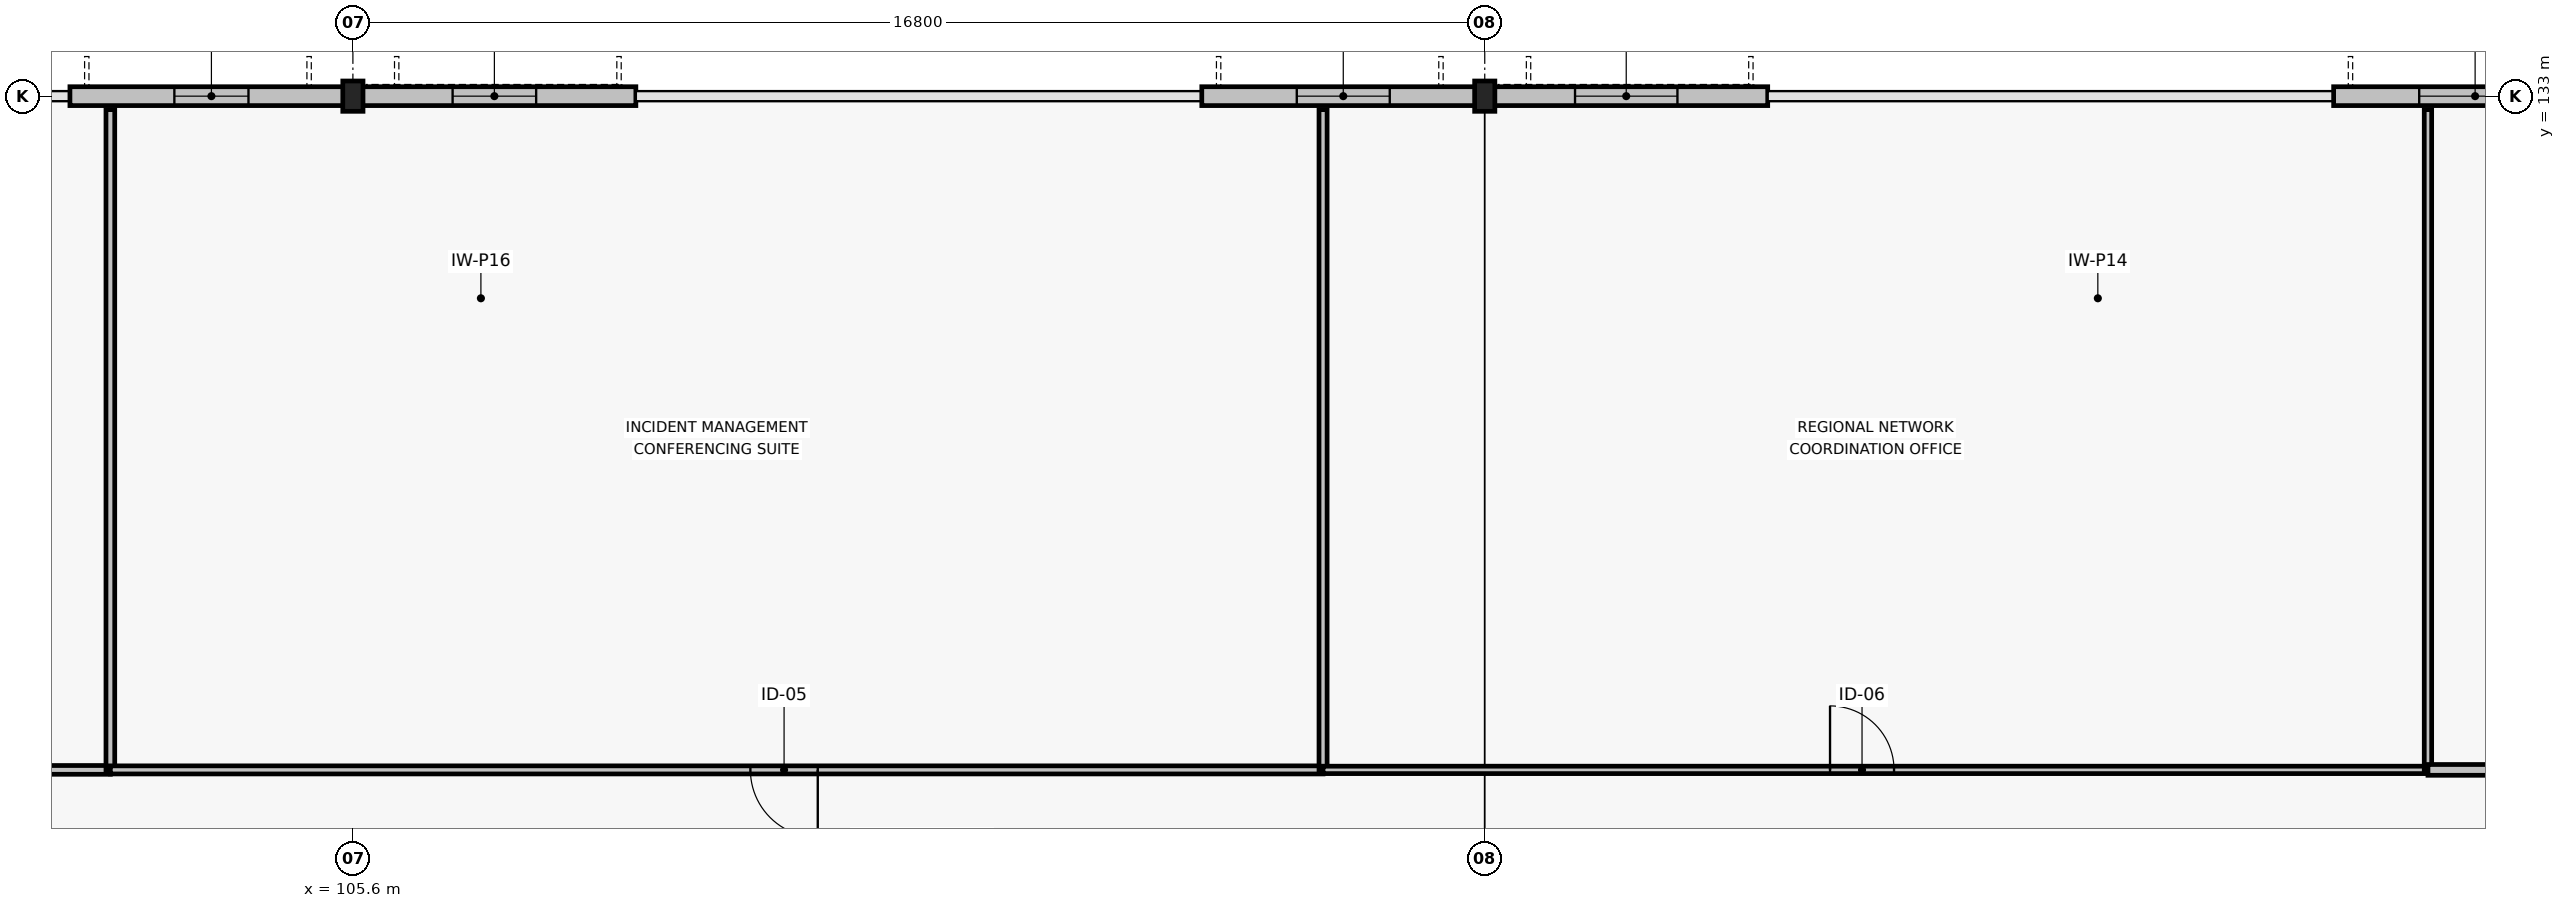
"""IFC4 building model, lengths in metres.
Left out: names, types, materials, properties, quantities, classifications, styles, units other than length and angle.
Written with IfcOpenShell. Run it as: python <this file> out.ifc"""

import sys

from ifc_helpers import new_model, si_unit, direction, frame, frame_2d, origin, origin_2d, place, context, subcontext, project, spatial, rectangle, i_section, extrude, element, fill, save


model = new_model("IFC4")
c1 = context("Model", 3, precision=1e-05, world=origin(), true_north=direction((0.0, 1.0)))
c2 = subcontext(c1, "Body", "Model", "MODEL_VIEW")
j1 = project(units=[si_unit("LENGTHUNIT", "METRE"), si_unit("PLANEANGLEUNIT", "RADIAN")], contexts=[c1])
p1 = place(None, origin())
s1 = spatial("IfcSite", under=j1, at=p1, CompositionType="ELEMENT")
p2 = place(p1, origin())
s2 = spatial("IfcBuilding", under=s1, at=p2, CompositionType="ELEMENT")
p3 = place(p2, frame((0.0, 0.0, 16.8)))
s3 = spatial("IfcBuildingStorey", under=s2, at=p3, CompositionType="ELEMENT", Elevation=16.8)
for number, where, z_axis, x_axis in (
    (1, (105.6, 133.0, 0.0), (0.0, 0.0, 1.0), (1.0, 0.0, 0.0)),
    (2, (122.4, 133.0, 0.0), (0.0, 0.0, 1.0), (1.0, 0.0, 0.0)),
):
    element("IfcColumn", number, at=place(p3, frame(where, z_axis=z_axis, x_axis=x_axis)), inside=s3, PredefinedType="COLUMN", context=c2, shape_type="SweptSolid", body=[
        extrude(i_section(OverallWidth=0.3, OverallDepth=0.45, WebThickness=0.014, FlangeThickness=0.026, FilletRadius=0.027, at=origin_2d()), origin(), (0.0, 0.0, 1.0), 4.2),
    ])
p4 = place(p3, frame((101.4, 133.0, 0.0), z_axis=(0.0, 0.0, 1.0), x_axis=(1.0, 0.0, 0.0)))
e3 = element("IfcWall", 3, at=p4, inside=s3, PredefinedType="STANDARD", context=c2, shape_type="SweptSolid", body=[
    extrude(rectangle(XDim=4.2, YDim=0.28, at=frame_2d((2.1, 0.0))), origin(), (0.0, 0.0, 1.0), 3.605),
])
p5 = place(p4, frame((1.55, 0.0, 0.8)))
e4 = element("IfcOpeningElement", 4, at=p5, cuts=e3, PredefinedType="OPENING", context=c2, shape_type="SweptSolid", body=[
    extrude(rectangle(XDim=1.1, YDim=1.53, at=frame_2d((0.55, 0.765))), frame((0.0, 0.15, 0.0), z_axis=(0.0, -1.0, 0.0), x_axis=(1.0, 0.0, 0.0)), (0.0, 0.0, 1.0), 0.3),
])
p6 = place(p3, frame((105.6, 133.0, 0.0), z_axis=(0.0, 0.0, 1.0), x_axis=(1.0, 0.0, 0.0)))
e5 = element("IfcWall", 5, at=p6, inside=s3, PredefinedType="STANDARD", context=c2, shape_type="SweptSolid", body=[
    extrude(rectangle(XDim=4.2, YDim=0.28, at=frame_2d((2.1, 0.0))), origin(), (0.0, 0.0, 1.0), 3.605),
])
p7 = place(p6, frame((1.48, 0.0, 0.8)))
e6 = element("IfcOpeningElement", 6, at=p7, cuts=e5, PredefinedType="OPENING", context=c2, shape_type="SweptSolid", body=[
    extrude(rectangle(XDim=1.24, YDim=1.59, at=frame_2d((0.62, 0.795))), frame((0.0, 0.15, 0.0), z_axis=(0.0, -1.0, 0.0), x_axis=(1.0, 0.0, 0.0)), (0.0, 0.0, 1.0), 0.3),
])
p8 = place(p3, frame((118.2, 133.0, 0.0), z_axis=(0.0, 0.0, 1.0), x_axis=(1.0, 0.0, 0.0)))
e7 = element("IfcWall", 7, at=p8, inside=s3, PredefinedType="STANDARD", context=c2, shape_type="SweptSolid", body=[
    extrude(rectangle(XDim=4.2, YDim=0.28, at=frame_2d((2.1, 0.0))), origin(), (0.0, 0.0, 1.0), 3.605),
])
p9 = place(p8, frame((1.41, 0.0, 0.8)))
e8 = element("IfcOpeningElement", 8, at=p9, cuts=e7, PredefinedType="OPENING", context=c2, shape_type="SweptSolid", body=[
    extrude(rectangle(XDim=1.38, YDim=1.47, at=frame_2d((0.69, 0.735))), frame((0.0, 0.15, 0.0), z_axis=(0.0, -1.0, 0.0), x_axis=(1.0, 0.0, 0.0)), (0.0, 0.0, 1.0), 0.3),
])
p10 = place(p3, frame((122.4, 133.0, 0.0), z_axis=(0.0, 0.0, 1.0), x_axis=(1.0, 0.0, 0.0)))
e9 = element("IfcWall", 9, at=p10, inside=s3, PredefinedType="STANDARD", context=c2, shape_type="SweptSolid", body=[
    extrude(rectangle(XDim=4.2, YDim=0.28, at=frame_2d((2.1, 0.0))), origin(), (0.0, 0.0, 1.0), 3.605),
])
p11 = place(p10, frame((1.34, 0.0, 0.8)))
e10 = element("IfcOpeningElement", 10, at=p11, cuts=e9, PredefinedType="OPENING", context=c2, shape_type="SweptSolid", body=[
    extrude(rectangle(XDim=1.52, YDim=1.53, at=frame_2d((0.76, 0.765))), frame((0.0, 0.15, 0.0), z_axis=(0.0, -1.0, 0.0), x_axis=(1.0, 0.0, 0.0)), (0.0, 0.0, 1.0), 0.3),
])
p12 = place(p3, frame((135.0, 133.0, 0.0), z_axis=(0.0, 0.0, 1.0), x_axis=(1.0, 0.0, 0.0)))
e11 = element("IfcWall", 11, at=p12, inside=s3, PredefinedType="STANDARD", context=c2, shape_type="SweptSolid", body=[
    extrude(rectangle(XDim=4.2, YDim=0.28, at=frame_2d((2.1, 0.0))), origin(), (0.0, 0.0, 1.0), 3.605),
])
p13 = place(p12, frame((1.27, 0.0, 0.8)))
e12 = element("IfcOpeningElement", 12, at=p13, cuts=e11, PredefinedType="OPENING", context=c2, shape_type="SweptSolid", body=[
    extrude(rectangle(XDim=1.66, YDim=1.59, at=frame_2d((0.83, 0.795))), frame((0.0, 0.15, 0.0), z_axis=(0.0, -1.0, 0.0), x_axis=(1.0, 0.0, 0.0)), (0.0, 0.0, 1.0), 0.3),
])
p14 = place(p3, frame((82.0, 123.0, 0.0), z_axis=(0.0, 0.0, 1.0), x_axis=(1.0, 0.0, 0.0)))
e13 = element("IfcWall", 13, at=p14, inside=s3, PredefinedType="PARTITIONING", context=c2, shape_type="SweptSolid", body=[
    extrude(rectangle(XDim=20.0, YDim=0.13, at=frame_2d((10.0, 0.0))), origin(), (0.0, 0.0, 1.0), 4.0),
])
p15 = place(p14, frame((12.75, 0.0, 0.0), z_axis=(0.0, 0.0, 1.0), x_axis=(-1.0, 0.0, 0.0)))
e14 = element("IfcOpeningElement", 14, at=p15, cuts=e13, PredefinedType="OPENING", context=c2, shape_type="SweptSolid", body=[
    extrude(rectangle(XDim=1.1, YDim=2.15, at=frame_2d((0.55, 1.075))), frame((0.0, 0.075, 0.0), z_axis=(0.0, -1.0, 0.0), x_axis=(1.0, 0.0, 0.0)), (0.0, 0.0, 1.0), 0.15),
])
p16 = place(p3, frame((102.0, 123.0, 0.0), z_axis=(0.0, 0.0, 1.0), x_axis=(0.0, 1.0, 0.0)))
e15 = element("IfcWall", 15, at=p16, inside=s3, PredefinedType="PARTITIONING", context=c2, shape_type="SweptSolid", body=[
    extrude(rectangle(XDim=9.8, YDim=0.13, at=frame_2d((4.9, 0.0))), origin(), (0.0, 0.0, 1.0), 4.0),
])
p17 = place(p3, frame((102.0, 123.0, 0.0), z_axis=(0.0, 0.0, 1.0), x_axis=(1.0, 0.0, 0.0)))
e16 = element("IfcWall", 16, at=p17, inside=s3, PredefinedType="PARTITIONING", context=c2, shape_type="SweptSolid", body=[
    extrude(rectangle(XDim=18.0, YDim=0.12, at=frame_2d((9.0, 0.0))), origin(), (0.0, 0.0, 1.0), 4.0),
])
p18 = place(p17, frame((9.5, 0.0, 0.0)))
e17 = element("IfcOpeningElement", 17, at=p18, cuts=e16, PredefinedType="OPENING", context=c2, shape_type="SweptSolid", body=[
    extrude(rectangle(XDim=1.0, YDim=2.15, at=frame_2d((0.5, 1.075))), frame((0.0, 0.07, 0.0), z_axis=(0.0, -1.0, 0.0), x_axis=(1.0, 0.0, 0.0)), (0.0, 0.0, 1.0), 0.14),
])
p19 = place(p3, frame((120.0, 123.0, 0.0), z_axis=(0.0, 0.0, 1.0), x_axis=(0.0, 1.0, 0.0)))
e18 = element("IfcWall", 18, at=p19, inside=s3, PredefinedType="PARTITIONING", context=c2, shape_type="SweptSolid", body=[
    extrude(rectangle(XDim=9.8, YDim=0.12, at=frame_2d((4.9, 0.0))), origin(), (0.0, 0.0, 1.0), 4.0),
])
p20 = place(p3, frame((120.0, 123.0, 0.0), z_axis=(0.0, 0.0, 1.0), x_axis=(1.0, 0.0, 0.0)))
e19 = element("IfcWall", 19, at=p20, inside=s3, PredefinedType="MOVABLE", context=c2, shape_type="SweptSolid", body=[
    extrude(rectangle(XDim=16.4, YDim=0.11, at=frame_2d((8.2, 0.0))), origin(), (0.0, 0.0, 1.0), 4.0),
])
p21 = place(p20, frame((7.525, 0.0, 0.0)))
e20 = element("IfcOpeningElement", 20, at=p21, cuts=e19, PredefinedType="OPENING", context=c2, shape_type="SweptSolid", body=[
    extrude(rectangle(XDim=0.95, YDim=2.15, at=frame_2d((0.475, 1.075))), frame((0.0, 0.065, 0.0), z_axis=(0.0, -1.0, 0.0), x_axis=(1.0, 0.0, 0.0)), (0.0, 0.0, 1.0), 0.13),
])
p22 = place(p3, frame((136.4, 123.0, 0.0), z_axis=(0.0, 0.0, 1.0), x_axis=(0.0, 1.0, 0.0)))
e21 = element("IfcWall", 21, at=p22, inside=s3, PredefinedType="MOVABLE", context=c2, shape_type="SweptSolid", body=[
    extrude(rectangle(XDim=9.8, YDim=0.11, at=frame_2d((4.9, 0.0))), origin(), (0.0, 0.0, 1.0), 4.0),
])
p23 = place(p3, frame((136.4, 123.0, 0.0), z_axis=(0.0, 0.0, 1.0), x_axis=(1.0, 0.0, 0.0)))
e22 = element("IfcWall", 22, at=p23, inside=s3, PredefinedType="PARTITIONING", context=c2, shape_type="SweptSolid", body=[
    extrude(rectangle(XDim=10.8, YDim=0.16, at=frame_2d((5.4, 0.0))), origin(), (0.0, 0.0, 1.0), 4.0),
])
p24 = place(p23, frame((6.925, 0.0, 0.0), z_axis=(0.0, 0.0, 1.0), x_axis=(-1.0, 0.0, 0.0)))
e23 = element("IfcOpeningElement", 23, at=p24, cuts=e22, PredefinedType="OPENING", context=c2, shape_type="SweptSolid", body=[
    extrude(rectangle(XDim=1.45, YDim=2.25, at=frame_2d((0.725, 1.125))), frame((0.0, 0.09, 0.0), z_axis=(0.0, -1.0, 0.0), x_axis=(1.0, 0.0, 0.0)), (0.0, 0.0, 1.0), 0.18),
])
p25 = place(p5, origin())
e24 = element("IfcWindow", 24, at=p25, inside=s3, PartitioningType="SINGLE_PANEL", PredefinedType="WINDOW", context=c2, shape_type="SweptSolid", body=[
    extrude(rectangle(XDim=1.1, YDim=1.53, at=frame_2d((0.55, 0.765))), frame((0.0, 0.03, 0.0), z_axis=(0.0, -1.0, 0.0), x_axis=(1.0, 0.0, 0.0)), (0.0, 0.0, 1.0), 0.06),
])
fill(e4, e24)
p26 = place(p7, origin())
e25 = element("IfcWindow", 25, at=p26, inside=s3, PartitioningType="SINGLE_PANEL", PredefinedType="WINDOW", context=c2, shape_type="SweptSolid", body=[
    extrude(rectangle(XDim=1.24, YDim=1.59, at=frame_2d((0.62, 0.795))), frame((0.0, 0.03, 0.0), z_axis=(0.0, -1.0, 0.0), x_axis=(1.0, 0.0, 0.0)), (0.0, 0.0, 1.0), 0.06),
])
fill(e6, e25)
p27 = place(p9, origin())
e26 = element("IfcWindow", 26, at=p27, inside=s3, PartitioningType="SINGLE_PANEL", PredefinedType="WINDOW", context=c2, shape_type="SweptSolid", body=[
    extrude(rectangle(XDim=1.38, YDim=1.47, at=frame_2d((0.69, 0.735))), frame((0.0, 0.03, 0.0), z_axis=(0.0, -1.0, 0.0), x_axis=(1.0, 0.0, 0.0)), (0.0, 0.0, 1.0), 0.06),
])
fill(e8, e26)
p28 = place(p11, origin())
e27 = element("IfcWindow", 27, at=p28, inside=s3, PartitioningType="SINGLE_PANEL", PredefinedType="WINDOW", context=c2, shape_type="SweptSolid", body=[
    extrude(rectangle(XDim=1.52, YDim=1.53, at=frame_2d((0.76, 0.765))), frame((0.0, 0.03, 0.0), z_axis=(0.0, -1.0, 0.0), x_axis=(1.0, 0.0, 0.0)), (0.0, 0.0, 1.0), 0.06),
])
fill(e10, e27)
p29 = place(p13, origin())
e28 = element("IfcWindow", 28, at=p29, inside=s3, PartitioningType="SINGLE_PANEL", PredefinedType="WINDOW", context=c2, shape_type="SweptSolid", body=[
    extrude(rectangle(XDim=1.66, YDim=1.59, at=frame_2d((0.83, 0.795))), frame((0.0, 0.03, 0.0), z_axis=(0.0, -1.0, 0.0), x_axis=(1.0, 0.0, 0.0)), (0.0, 0.0, 1.0), 0.06),
])
fill(e12, e28)
p30 = place(p18, origin())
e29 = element("IfcDoor", 29, at=p30, inside=s3, OperationType="SINGLE_SWING_RIGHT", PredefinedType="DOOR", context=c2, shape_type="SweptSolid", body=[
    extrude(rectangle(XDim=1.0, YDim=2.15, at=frame_2d((0.5, 1.075))), frame((0.0, 0.025, 0.0), z_axis=(0.0, -1.0, 0.0), x_axis=(1.0, 0.0, 0.0)), (0.0, 0.0, 1.0), 0.05),
])
fill(e17, e29)
p31 = place(p21, origin())
e30 = element("IfcDoor", 30, at=p31, inside=s3, OperationType="SINGLE_SWING_LEFT", PredefinedType="DOOR", context=c2, shape_type="SweptSolid", body=[
    extrude(rectangle(XDim=0.95, YDim=2.15, at=frame_2d((0.475, 1.075))), frame((0.0, 0.025, 0.0), z_axis=(0.0, -1.0, 0.0), x_axis=(1.0, 0.0, 0.0)), (0.0, 0.0, 1.0), 0.05),
])
fill(e20, e30)
save(model, sys.argv[1])
